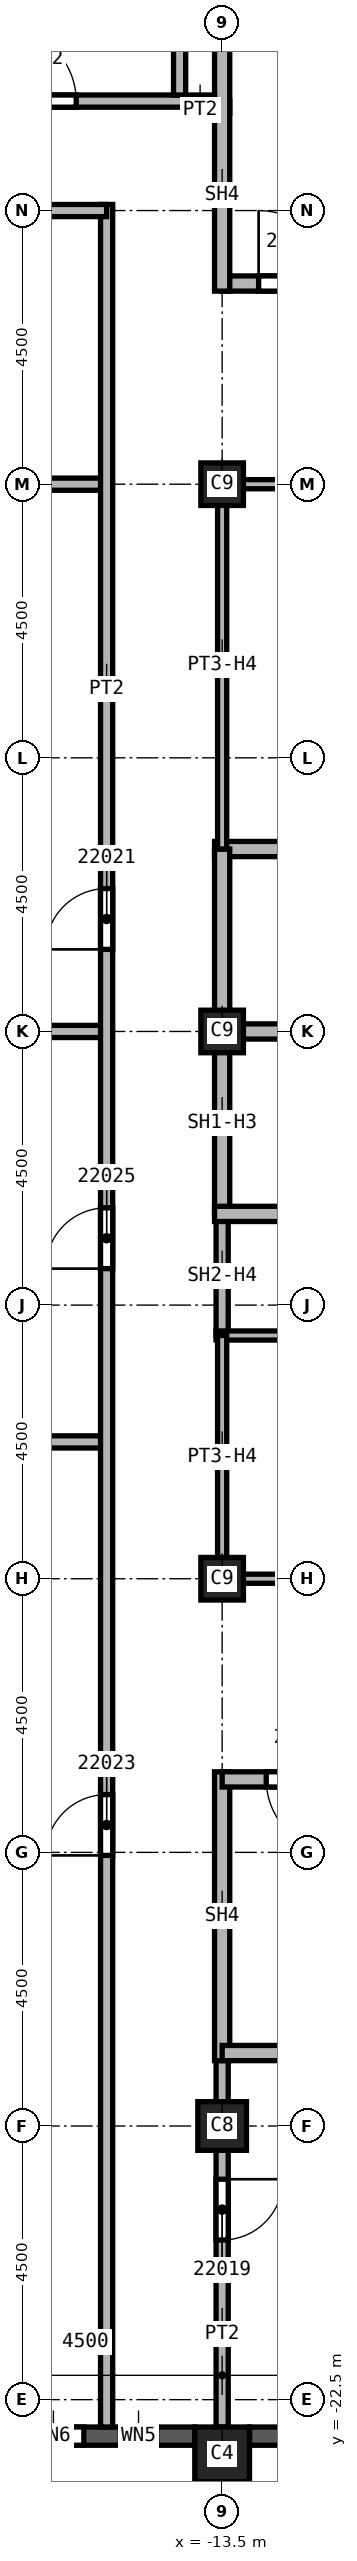
"""IFC4 building model, lengths in metres.
Left out: names, types, materials, properties, quantities, classifications, styles, units other than length and angle.
Written with IfcOpenShell. Run it as: python <this file> out.ifc"""

import sys

from ifc_helpers import new_model, si_unit, direction, frame, frame_2d, origin, origin_2d, place, context, subcontext, project, spatial, rectangle, extrude, element, fill, save


model = new_model("IFC4")
c1 = context("Model", 3, precision=1e-05, world=origin(), true_north=direction((0.0, 1.0)))
c2 = subcontext(c1, "Body", "Model", "MODEL_VIEW")
j1 = project(units=[si_unit("LENGTHUNIT", "METRE"), si_unit("PLANEANGLEUNIT", "RADIAN")], contexts=[c1])
p1 = place(None, origin())
s1 = spatial("IfcSite", under=j1, at=p1, CompositionType="ELEMENT")
p2 = place(p1, origin())
s2 = spatial("IfcBuilding", under=s1, at=p2, CompositionType="ELEMENT")
p3 = place(p2, frame((0.0, 0.0, 312.0)))
s3 = spatial("IfcBuildingStorey", under=s2, at=p3, CompositionType="ELEMENT", Elevation=312.0)
p4 = place(p3, frame((-13.5, -18.0, 0.0), z_axis=(0.0, 0.0, 1.0), x_axis=(1.0, 0.0, 0.0)))
e1 = element("IfcColumn", 1, at=p4, inside=s3, PredefinedType="COLUMN", context=c2, shape_type="SweptSolid", body=[
    extrude(rectangle(XDim=0.8, YDim=0.8, at=origin_2d()), origin(), (0.0, 0.0, 1.0), 3.74),
])
for number, where, z_axis, x_axis in (
    (2, (-13.5, 0.0, 0.0), (0.0, 0.0, 1.0), (1.0, 0.0, 0.0)),
    (3, (-13.5, 9.0, 0.0), (0.0, 0.0, 1.0), (1.0, 0.0, 0.0)),
    (4, (-13.5, -9.0, 0.0), (0.0, 0.0, 1.0), (1.0, 0.0, 0.0)),
):
    element("IfcColumn", number, at=place(p3, frame(where, z_axis=z_axis, x_axis=x_axis)), inside=s3, PredefinedType="COLUMN", context=c2, shape_type="SweptSolid", body=[
        extrude(rectangle(XDim=0.7, YDim=0.7, at=origin_2d()), origin(), (0.0, 0.0, 1.0), 3.74),
    ])
p5 = place(p3, frame((-13.5, -23.4, 0.0), z_axis=(0.0, 0.0, 1.0), x_axis=(1.0, 0.0, 0.0)))
e5 = element("IfcColumn", 5, at=p5, inside=s3, PredefinedType="COLUMN", context=c2, shape_type="SweptSolid", body=[
    extrude(rectangle(XDim=0.9, YDim=0.9, at=origin_2d()), origin(), (0.0, 0.0, 1.0), 3.74),
])
p6 = place(p3, frame((-17.55, -23.1, 0.0), z_axis=(0.0, 0.0, 1.0), x_axis=(1.0, 0.0, 0.0)))
e6 = element("IfcWall", 6, at=p6, inside=s3, PredefinedType="SOLIDWALL", context=c2, shape_type="SweptSolid", body=[
    extrude(rectangle(XDim=3.6, YDim=0.3, at=frame_2d((1.8, 0.0))), origin(), (0.0, 0.0, 1.0), 3.14),
])
p7 = place(p6, frame((0.775, 0.0, 0.8)))
e7 = element("IfcOpeningElement", 7, at=p7, cuts=e6, PredefinedType="OPENING", context=c2, shape_type="SweptSolid", body=[
    extrude(rectangle(XDim=1.0, YDim=1.95, at=frame_2d((0.5, 0.975))), frame((0.0, 0.15, 0.0), z_axis=(0.0, -1.0, 0.0), x_axis=(1.0, 0.0, 0.0)), (0.0, 0.0, 1.0), 0.3),
])
p8 = place(p6, frame((2.375, 0.0, 0.8)))
e8 = element("IfcOpeningElement", 8, at=p8, cuts=e6, PredefinedType="OPENING", context=c2, shape_type="SweptSolid", body=[
    extrude(rectangle(XDim=0.6, YDim=1.95, at=frame_2d((0.3, 0.975))), frame((0.0, 0.15, 0.0), z_axis=(0.0, -1.0, 0.0), x_axis=(1.0, 0.0, 0.0)), (0.0, 0.0, 1.0), 0.3),
])
p9 = place(p3, frame((-13.05, -23.1, 0.0), z_axis=(0.0, 0.0, 1.0), x_axis=(1.0, 0.0, 0.0)))
e9 = element("IfcWall", 9, at=p9, inside=s3, PredefinedType="SOLIDWALL", context=c2, shape_type="SweptSolid", body=[
    extrude(rectangle(XDim=3.6, YDim=0.3, at=frame_2d((1.8, 0.0))), origin(), (0.0, 0.0, 1.0), 3.14),
])
p10 = place(p9, frame((0.6, 0.0, 0.8)))
e10 = element("IfcOpeningElement", 10, at=p10, cuts=e9, PredefinedType="OPENING", context=c2, shape_type="SweptSolid", body=[
    extrude(rectangle(XDim=2.4, YDim=1.95, at=frame_2d((1.2, 0.975))), frame((0.0, 0.15, 0.0), z_axis=(0.0, -1.0, 0.0), x_axis=(1.0, 0.0, 0.0)), (0.0, 0.0, 1.0), 0.3),
])
for number, where, z_axis, x_axis in (
    (11, (-26.55, -6.75, 0.0), (0.0, 0.0, 1.0), (1.0, 0.0, 0.0)),
    (12, (-26.55, 9.0, 0.0), (0.0, 0.0, 1.0), (1.0, 0.0, 0.0)),
    (13, (-15.4, 0.0, 0.0), (0.0, 0.0, 1.0), (-1.0, 0.0, 0.0)),
):
    element("IfcWall", number, at=place(p3, frame(where, z_axis=z_axis, x_axis=x_axis)), inside=s3, PredefinedType="PARTITIONING", context=c2, shape_type="SweptSolid", body=[
        extrude(rectangle(XDim=11.15, YDim=0.2, at=frame_2d((5.575, 0.0))), origin(), (0.0, 0.0, 1.0), 3.74),
    ])
p11 = place(p3, frame((-15.4, -22.95, 0.0), z_axis=(0.0, 0.0, 1.0), x_axis=(0.0, 1.0, 0.0)))
e14 = element("IfcWall", 14, at=p11, inside=s3, PredefinedType="PARTITIONING", context=c2, shape_type="SweptSolid", body=[
    extrude(rectangle(XDim=36.55, YDim=0.2, at=frame_2d((18.275, 0.0))), origin(), (0.0, 0.0, 1.0), 3.74),
])
p12 = place(p11, frame((24.3, 0.0, 0.0)))
e15 = element("IfcOpeningElement", 15, at=p12, cuts=e14, PredefinedType="OPENING", context=c2, shape_type="SweptSolid", body=[
    extrude(rectangle(XDim=1.0, YDim=2.1, at=frame_2d((0.5, 1.05))), frame((0.0, 0.1, 0.0), z_axis=(0.0, -1.0, 0.0), x_axis=(1.0, 0.0, 0.0)), (0.0, 0.0, 1.0), 0.2),
])
p13 = place(p11, frame((9.4, 0.0, 0.0)))
e16 = element("IfcOpeningElement", 16, at=p13, cuts=e14, PredefinedType="OPENING", context=c2, shape_type="SweptSolid", body=[
    extrude(rectangle(XDim=1.0, YDim=2.1, at=frame_2d((0.5, 1.05))), frame((0.0, 0.1, 0.0), z_axis=(0.0, -1.0, 0.0), x_axis=(1.0, 0.0, 0.0)), (0.0, 0.0, 1.0), 0.2),
])
p14 = place(p11, frame((19.05, 0.0, 0.0)))
e17 = element("IfcOpeningElement", 17, at=p14, cuts=e14, PredefinedType="OPENING", context=c2, shape_type="SweptSolid", body=[
    extrude(rectangle(XDim=1.0, YDim=2.1, at=frame_2d((0.5, 1.05))), frame((0.0, 0.1, 0.0), z_axis=(0.0, -1.0, 0.0), x_axis=(1.0, 0.0, 0.0)), (0.0, 0.0, 1.0), 0.2),
])
p15 = place(p3, frame((-15.4, 13.5, 0.0), z_axis=(0.0, 0.0, 1.0), x_axis=(-1.0, 0.0, 0.0)))
e18 = element("IfcWall", 18, at=p15, inside=s3, PredefinedType="PARTITIONING", context=c2, shape_type="SweptSolid", body=[
    extrude(rectangle(XDim=6.6, YDim=0.2, at=frame_2d((3.3, 0.0))), origin(), (0.0, 0.0, 1.0), 3.74),
])
p16 = place(p15, frame((5.35, 0.0, 0.0)))
e19 = element("IfcOpeningElement", 19, at=p16, cuts=e18, PredefinedType="OPENING", context=c2, shape_type="SweptSolid", body=[
    extrude(rectangle(XDim=1.0, YDim=2.1, at=frame_2d((0.5, 1.05))), frame((0.0, 0.1, 0.0), z_axis=(0.0, -1.0, 0.0), x_axis=(1.0, 0.0, 0.0)), (0.0, 0.0, 1.0), 0.2),
])
p17 = place(p3, frame((-14.1, 15.2, 0.0), z_axis=(0.0, 0.0, 1.0), x_axis=(1.0, 0.0, 0.0)))
e20 = element("IfcWall", 20, at=p17, inside=s3, PredefinedType="PARTITIONING", context=c2, shape_type="SweptSolid", body=[
    extrude(rectangle(XDim=0.725, YDim=0.2, at=frame_2d((0.363, 0.0))), origin(), (0.0, 0.0, 1.0), 3.74),
])
p18 = place(p3, frame((-13.5, -16.675, 0.0), z_axis=(0.0, 0.0, 1.0), x_axis=(0.0, -1.0, 0.0)))
e21 = element("IfcWall", 21, at=p18, inside=s3, PredefinedType="PARTITIONING", context=c2, shape_type="SweptSolid", body=[
    extrude(rectangle(XDim=6.275, YDim=0.2, at=frame_2d((3.137, 0.0))), origin(), (0.0, 0.0, 1.0), 3.74),
])
p19 = place(p18, frame((2.2, 0.0, 0.0)))
e22 = element("IfcOpeningElement", 22, at=p19, cuts=e21, PredefinedType="OPENING", context=c2, shape_type="SweptSolid", body=[
    extrude(rectangle(XDim=1.0, YDim=2.1, at=frame_2d((0.5, 1.05))), frame((0.0, 0.1, 0.0), z_axis=(0.0, -1.0, 0.0), x_axis=(1.0, 0.0, 0.0)), (0.0, 0.0, 1.0), 0.2),
])
p20 = place(p3, frame((-13.5, -5.0, 0.0), z_axis=(0.0, 0.0, 1.0), x_axis=(0.0, 1.0, 0.0)))
e23 = element("IfcWall", 23, at=p20, inside=s3, PredefinedType="SOLIDWALL", context=c2, shape_type="SweptSolid", body=[
    extrude(rectangle(XDim=2.0, YDim=0.2, at=frame_2d((1.0, 0.0))), origin(), (0.0, 0.0, 1.0), 3.062),
])
p21 = place(p3, frame((-13.625, 0.0, 0.0), z_axis=(0.0, 0.0, 1.0), x_axis=(1.0, 0.0, 0.0)))
e24 = element("IfcWall", 24, at=p21, inside=s3, PredefinedType="SOLIDWALL", context=c2, shape_type="SweptSolid", body=[
    extrude(rectangle(XDim=3.125, YDim=0.25, at=frame_2d((1.562, 0.0))), origin(), (0.0, 0.0, 1.0), 3.74),
])
p22 = place(p3, frame((-13.625, 3.0, 0.0), z_axis=(0.0, 0.0, 1.0), x_axis=(1.0, 0.0, 0.0)))
e25 = element("IfcWall", 25, at=p22, inside=s3, PredefinedType="SOLIDWALL", context=c2, shape_type="SweptSolid", body=[
    extrude(rectangle(XDim=6.125, YDim=0.25, at=frame_2d((3.062, 0.0))), origin(), (0.0, 0.0, 1.0), 3.74),
])
p23 = place(p22, frame((4.0, 0.0, 0.0)))
e26 = element("IfcOpeningElement", 26, at=p23, cuts=e25, PredefinedType="OPENING", context=c2, shape_type="SweptSolid", body=[
    extrude(rectangle(XDim=1.1, YDim=2.1, at=frame_2d((0.55, 1.05))), frame((0.0, 0.125, 0.0), z_axis=(0.0, -1.0, 0.0), x_axis=(1.0, 0.0, 0.0)), (0.0, 0.0, 1.0), 0.25),
])
p24 = place(p3, frame((-13.5, -3.0, 0.0), z_axis=(0.0, 0.0, 1.0), x_axis=(0.0, 1.0, 0.0)))
e27 = element("IfcWall", 27, at=p24, inside=s3, PredefinedType="SOLIDWALL", context=c2, shape_type="SweptSolid", body=[
    extrude(rectangle(XDim=6.0, YDim=0.25, at=frame_2d((3.0, 0.0))), origin(), (0.0, 0.0, 1.0), 3.062),
])
p25 = place(p3, frame((-13.625, -3.0, 0.0), z_axis=(0.0, 0.0, 1.0), x_axis=(1.0, 0.0, 0.0)))
e28 = element("IfcWall", 28, at=p25, inside=s3, PredefinedType="SOLIDWALL", context=c2, shape_type="SweptSolid", body=[
    extrude(rectangle(XDim=6.125, YDim=0.25, at=frame_2d((3.062, 0.0))), origin(), (0.0, 0.0, 1.0), 3.74),
])
p26 = place(p25, frame((4.0, 0.0, 0.0)))
e29 = element("IfcOpeningElement", 29, at=p26, cuts=e28, PredefinedType="OPENING", context=c2, shape_type="SweptSolid", body=[
    extrude(rectangle(XDim=1.1, YDim=2.1, at=frame_2d((0.55, 1.05))), frame((0.0, 0.125, 0.0), z_axis=(0.0, -1.0, 0.0), x_axis=(1.0, 0.0, 0.0)), (0.0, 0.0, 1.0), 0.25),
])
p27 = place(p3, frame((-13.5, -12.175, 0.0), z_axis=(0.0, 0.0, 1.0), x_axis=(0.0, -1.0, 0.0)))
e30 = element("IfcWall", 30, at=p27, inside=s3, PredefinedType="SOLIDWALL", context=c2, shape_type="SweptSolid", body=[
    extrude(rectangle(XDim=4.75, YDim=0.25, at=frame_2d((2.375, 0.0))), origin(), (0.0, 0.0, 1.0), 3.74),
])
p28 = place(p3, frame((-13.5, 12.3, 0.0), z_axis=(0.0, 0.0, 1.0), x_axis=(1.0, 0.0, 0.0)))
e31 = element("IfcWall", 31, at=p28, inside=s3, PredefinedType="SOLIDWALL", context=c2, shape_type="SweptSolid", body=[
    extrude(rectangle(XDim=9.125, YDim=0.25, at=frame_2d((4.562, 0.0))), origin(), (0.0, 0.0, 1.0), 3.74),
])
p29 = place(p28, frame((0.6, 0.0, 0.0)))
e32 = element("IfcOpeningElement", 32, at=p29, cuts=e31, PredefinedType="OPENING", context=c2, shape_type="SweptSolid", body=[
    extrude(rectangle(XDim=1.2, YDim=2.1, at=frame_2d((0.6, 1.05))), frame((0.0, 0.125, 0.0), z_axis=(0.0, -1.0, 0.0), x_axis=(1.0, 0.0, 0.0)), (0.0, 0.0, 1.0), 0.25),
])
p30 = place(p3, frame((-13.5, 12.175, 0.0), z_axis=(0.0, 0.0, 1.0), x_axis=(0.0, 1.0, 0.0)))
e33 = element("IfcWall", 33, at=p30, inside=s3, PredefinedType="SOLIDWALL", context=c2, shape_type="SweptSolid", body=[
    extrude(rectangle(XDim=4.75, YDim=0.25, at=frame_2d((2.375, 0.0))), origin(), (0.0, 0.0, 1.0), 3.74),
])
p31 = place(p3, frame((-4.5, -16.8, 0.0), z_axis=(0.0, 0.0, 1.0), x_axis=(-1.0, 0.0, 0.0)))
e34 = element("IfcWall", 34, at=p31, inside=s3, PredefinedType="SOLIDWALL", context=c2, shape_type="SweptSolid", body=[
    extrude(rectangle(XDim=9.0, YDim=0.25, at=frame_2d((4.5, 0.0))), origin(), (0.0, 0.0, 1.0), 3.74),
])
p32 = place(p3, frame((-4.375, -12.3, 0.0), z_axis=(0.0, 0.0, 1.0), x_axis=(-1.0, 0.0, 0.0)))
e35 = element("IfcWall", 35, at=p32, inside=s3, PredefinedType="SOLIDWALL", context=c2, shape_type="SweptSolid", body=[
    extrude(rectangle(XDim=9.125, YDim=0.25, at=frame_2d((4.562, 0.0))), origin(), (0.0, 0.0, 1.0), 3.74),
])
p33 = place(p32, frame((7.2, 0.0, 0.0)))
e36 = element("IfcOpeningElement", 36, at=p33, cuts=e35, PredefinedType="OPENING", context=c2, shape_type="SweptSolid", body=[
    extrude(rectangle(XDim=1.2, YDim=2.1, at=frame_2d((0.6, 1.05))), frame((0.0, 0.125, 0.0), z_axis=(0.0, -1.0, 0.0), x_axis=(1.0, 0.0, 0.0)), (0.0, 0.0, 1.0), 0.25),
])
p34 = place(p3, frame((-13.6, -5.0, 0.0), z_axis=(0.0, 0.0, 1.0), x_axis=(1.0, 0.0, 0.0)))
e37 = element("IfcWall", 37, at=p34, inside=s3, PredefinedType="PARTITIONING", context=c2, shape_type="SweptSolid", body=[
    extrude(rectangle(XDim=3.1, YDim=0.15, at=frame_2d((1.55, 0.0))), origin(), (0.0, 0.0, 1.0), 3.74),
])
p35 = place(p3, frame((-13.5, -9.075, 0.0), z_axis=(0.0, 0.0, 1.0), x_axis=(0.0, 1.0, 0.0)))
e38 = element("IfcWall", 38, at=p35, inside=s3, PredefinedType="PARTITIONING", context=c2, shape_type="SweptSolid", body=[
    extrude(rectangle(XDim=4.075, YDim=0.15, at=frame_2d((2.038, 0.0))), origin(), (0.0, 0.0, 1.0), 3.062),
])
p36 = place(p3, frame((-13.5, 3.0, 0.0), z_axis=(0.0, 0.0, 1.0), x_axis=(0.0, 1.0, 0.0)))
e39 = element("IfcWall", 39, at=p36, inside=s3, PredefinedType="PARTITIONING", context=c2, shape_type="SweptSolid", body=[
    extrude(rectangle(XDim=6.075, YDim=0.15, at=frame_2d((3.038, 0.0))), origin(), (0.0, 0.0, 1.0), 3.062),
])
for number, where, z_axis, x_axis in (
    (40, (-13.5, 9.0, 0.0), (0.0, 0.0, 1.0), (1.0, 0.0, 0.0)),
    (41, (-10.5, -9.0, 0.0), (0.0, 0.0, 1.0), (-1.0, 0.0, 0.0)),
):
    element("IfcWall", number, at=place(p3, frame(where, z_axis=z_axis, x_axis=x_axis)), inside=s3, PredefinedType="PARTITIONING", context=c2, shape_type="SweptSolid", body=[
        extrude(rectangle(XDim=3.0, YDim=0.15, at=frame_2d((1.5, 0.0))), origin(), (0.0, 0.0, 1.0), 3.062),
    ])
p37 = place(p3, frame((-21.9, 15.3, 0.0), z_axis=(0.0, 0.0, 1.0), x_axis=(1.0, 0.0, 0.0)))
e42 = element("IfcWall", 42, at=p37, inside=s3, PredefinedType="SOLIDWALL", context=c2, shape_type="SweptSolid", body=[
    extrude(rectangle(XDim=8.275, YDim=0.2, at=frame_2d((4.137, 0.0))), origin(), (0.0, 0.0, 1.0), 3.74),
])
p38 = place(p37, frame((4.8, 0.0, 0.0)))
e43 = element("IfcOpeningElement", 43, at=p38, cuts=e42, PredefinedType="OPENING", context=c2, shape_type="SweptSolid", body=[
    extrude(rectangle(XDim=1.2, YDim=2.1, at=frame_2d((0.6, 1.05))), frame((0.0, 0.1, 0.0), z_axis=(0.0, -1.0, 0.0), x_axis=(1.0, 0.0, 0.0)), (0.0, 0.0, 1.0), 0.2),
])
p39 = place(p3, frame((-14.2, 15.4, 0.0), z_axis=(0.0, 0.0, 1.0), x_axis=(0.0, 1.0, 0.0)))
e44 = element("IfcWall", 44, at=p39, inside=s3, PredefinedType="SOLIDWALL", context=c2, shape_type="SweptSolid", body=[
    extrude(rectangle(XDim=5.9, YDim=0.2, at=frame_2d((2.95, 0.0))), origin(), (0.0, 0.0, 1.0), 3.74),
])
p40 = place(p29, origin())
e45 = element("IfcDoor", 45, at=p40, inside=s3, OperationType="SINGLE_SWING_LEFT", PredefinedType="DOOR", context=c2, shape_type="SweptSolid", body=[
    extrude(rectangle(XDim=1.2, YDim=2.1, at=frame_2d((0.6, 1.05))), frame((0.0, 0.025, 0.0), z_axis=(0.0, -1.0, 0.0), x_axis=(1.0, 0.0, 0.0)), (0.0, 0.0, 1.0), 0.05),
])
fill(e32, e45)
p41 = place(p33, origin())
e46 = element("IfcDoor", 46, at=p41, inside=s3, OperationType="SINGLE_SWING_RIGHT", PredefinedType="DOOR", context=c2, shape_type="SweptSolid", body=[
    extrude(rectangle(XDim=1.2, YDim=2.1, at=frame_2d((0.6, 1.05))), frame((0.0, 0.025, 0.0), z_axis=(0.0, -1.0, 0.0), x_axis=(1.0, 0.0, 0.0)), (0.0, 0.0, 1.0), 0.05),
])
fill(e36, e46)
p42 = place(p19, origin())
e47 = element("IfcDoor", 47, at=p42, inside=s3, OperationType="SINGLE_SWING_RIGHT", PredefinedType="DOOR", context=c2, shape_type="SweptSolid", body=[
    extrude(rectangle(XDim=1.0, YDim=2.1, at=frame_2d((0.5, 1.05))), frame((0.0, 0.025, 0.0), z_axis=(0.0, -1.0, 0.0), x_axis=(1.0, 0.0, 0.0)), (0.0, 0.0, 1.0), 0.05),
])
fill(e22, e47)
p43 = place(p12, origin())
e48 = element("IfcDoor", 48, at=p43, inside=s3, OperationType="SINGLE_SWING_RIGHT", PredefinedType="DOOR", context=c2, shape_type="SweptSolid", body=[
    extrude(rectangle(XDim=1.0, YDim=2.1, at=frame_2d((0.5, 1.05))), frame((0.0, 0.025, 0.0), z_axis=(0.0, -1.0, 0.0), x_axis=(1.0, 0.0, 0.0)), (0.0, 0.0, 1.0), 0.05),
])
fill(e15, e48)
p44 = place(p13, origin())
e49 = element("IfcDoor", 49, at=p44, inside=s3, OperationType="SINGLE_SWING_RIGHT", PredefinedType="DOOR", context=c2, shape_type="SweptSolid", body=[
    extrude(rectangle(XDim=1.0, YDim=2.1, at=frame_2d((0.5, 1.05))), frame((0.0, 0.025, 0.0), z_axis=(0.0, -1.0, 0.0), x_axis=(1.0, 0.0, 0.0)), (0.0, 0.0, 1.0), 0.05),
])
fill(e16, e49)
p45 = place(p14, origin())
e50 = element("IfcDoor", 50, at=p45, inside=s3, OperationType="SINGLE_SWING_RIGHT", PredefinedType="DOOR", context=c2, shape_type="SweptSolid", body=[
    extrude(rectangle(XDim=1.0, YDim=2.1, at=frame_2d((0.5, 1.05))), frame((0.0, 0.025, 0.0), z_axis=(0.0, -1.0, 0.0), x_axis=(1.0, 0.0, 0.0)), (0.0, 0.0, 1.0), 0.05),
])
fill(e17, e50)
p46 = place(p38, origin())
e51 = element("IfcDoor", 51, at=p46, inside=s3, OperationType="SINGLE_SWING_RIGHT", PredefinedType="DOOR", context=c2, shape_type="SweptSolid", body=[
    extrude(rectangle(XDim=1.2, YDim=2.1, at=frame_2d((0.6, 1.05))), frame((0.0, 0.025, 0.0), z_axis=(0.0, -1.0, 0.0), x_axis=(1.0, 0.0, 0.0)), (0.0, 0.0, 1.0), 0.05),
])
fill(e43, e51)
p47 = place(p7, origin())
e52 = element("IfcWindow", 52, at=p47, inside=s3, PartitioningType="SINGLE_PANEL", PredefinedType="WINDOW", context=c2, shape_type="SweptSolid", body=[
    extrude(rectangle(XDim=1.0, YDim=1.95, at=frame_2d((0.5, 0.975))), frame((0.0, 0.03, 0.0), z_axis=(0.0, -1.0, 0.0), x_axis=(1.0, 0.0, 0.0)), (0.0, 0.0, 1.0), 0.06),
])
fill(e7, e52)
p48 = place(p8, origin())
e53 = element("IfcWindow", 53, at=p48, inside=s3, PartitioningType="SINGLE_PANEL", PredefinedType="WINDOW", context=c2, shape_type="SweptSolid", body=[
    extrude(rectangle(XDim=0.6, YDim=1.95, at=frame_2d((0.3, 0.975))), frame((0.0, 0.03, 0.0), z_axis=(0.0, -1.0, 0.0), x_axis=(1.0, 0.0, 0.0)), (0.0, 0.0, 1.0), 0.06),
])
fill(e8, e53)
save(model, sys.argv[1])
